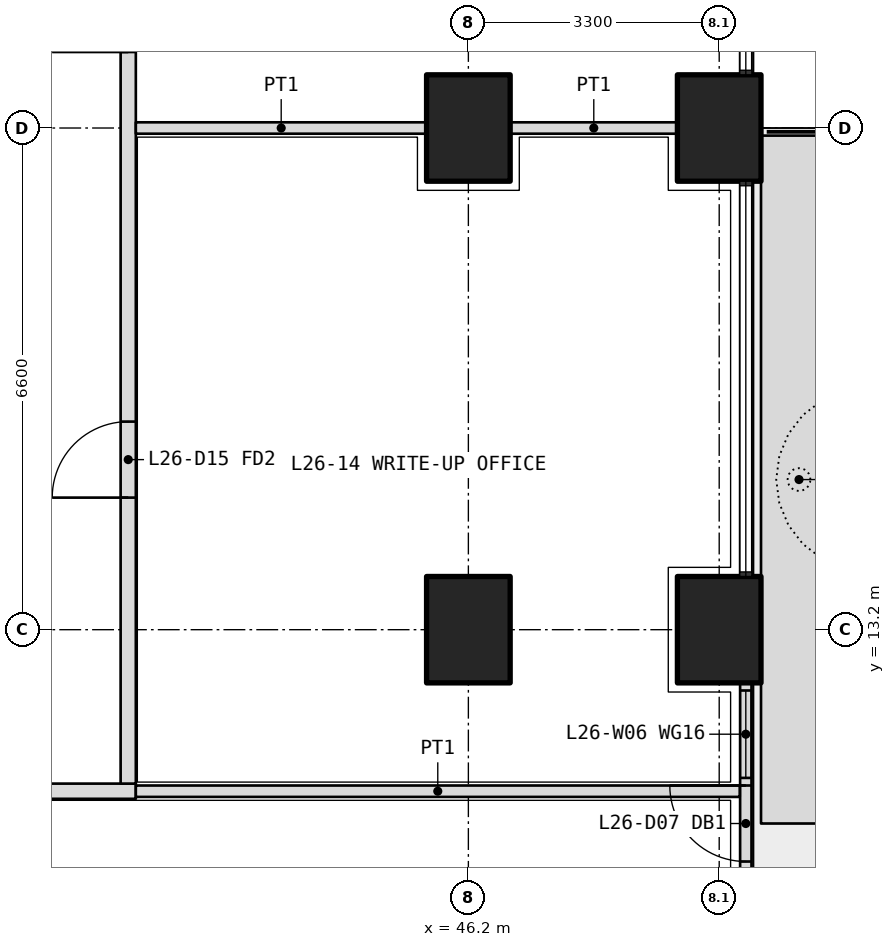
"""IFC4 building model, lengths in metres.
Left out: names, types, materials, properties, quantities, classifications, styles, units other than length and angle.
Written with IfcOpenShell. Run it as: python <this file> out.ifc"""

import sys

from ifc_helpers import new_model, si_unit, direction, frame, frame_2d, origin, origin_2d, place, context, subcontext, project, spatial, polyline, rectangle, outline, extrude, element, fill, save


model = new_model("IFC4")
c1 = context("Model", 3, precision=1e-05, world=origin(), true_north=direction((0.0, 1.0)))
c2 = subcontext(c1, "Body", "Model", "MODEL_VIEW")
j1 = project(units=[si_unit("LENGTHUNIT", "METRE"), si_unit("PLANEANGLEUNIT", "RADIAN")], contexts=[c1])
p1 = place(None, origin())
s1 = spatial("IfcSite", under=j1, at=p1, CompositionType="ELEMENT")
p2 = place(p1, origin())
s2 = spatial("IfcBuilding", under=s1, at=p2, CompositionType="ELEMENT")
p3 = place(p2, frame((0.0, 0.0, 115.8)))
s3 = spatial("IfcBuildingStorey", under=s2, at=p3, CompositionType="ELEMENT", Elevation=115.8)
for number, where, z_axis, x_axis in (
    (1, (49.5, 13.2, 0.0), (0.0, 0.0, 1.0), (0.0, 1.0, 0.0)),
    (2, (49.5, 19.8, 0.0), (0.0, 0.0, 1.0), (0.0, 1.0, 0.0)),
    (3, (46.2, 13.2, 0.0), (0.0, 0.0, 1.0), (0.0, 1.0, 0.0)),
    (4, (46.2, 19.8, 0.0), (0.0, 0.0, 1.0), (0.0, 1.0, 0.0)),
):
    element("IfcColumn", number, at=place(p3, frame(where, z_axis=z_axis, x_axis=x_axis)), inside=s3, PredefinedType="COLUMN", context=c2, shape_type="SweptSolid", body=[
        extrude(rectangle(XDim=1.4, YDim=1.1, at=origin_2d()), origin(), (0.0, 0.0, 1.0), 4.2),
    ])
p4 = place(p3, origin())
e5 = element("IfcWall", 5, at=p4, inside=s3, PredefinedType="USERDEFINED", context=c2, shape_type="SweptSolid", body=[
    extrude(outline(polyline([(50.05, 10.65), (51.05, 10.65), (51.05, 19.7), (50.05, 19.7), (50.05, 10.65)]), holes=[polyline([(50.2, 10.8), (50.9, 10.8), (50.9, 19.55), (50.2, 19.55), (50.2, 10.8)])]), origin(), (0.0, 0.0, 1.0), 1.05),
])
p5 = place(p3, frame((49.85, 7.3, 0.0), z_axis=(0.0, 0.0, 1.0), x_axis=(0.0, 1.0, 0.0)))
e6 = element("IfcWall", 6, at=p5, inside=s3, PredefinedType="SOLIDWALL", context=c2, shape_type="SweptSolid", body=[
    extrude(rectangle(XDim=5.2, YDim=0.15, at=frame_2d((2.6, 0.0))), origin(), (0.0, 0.0, 1.0), 2.7),
])
p6 = place(p5, frame((2.85, 0.0, 0.0)))
e7 = element("IfcOpeningElement", 7, at=p6, cuts=e6, PredefinedType="OPENING", context=c2, shape_type="SweptSolid", body=[
    extrude(rectangle(XDim=1.0, YDim=2.4, at=frame_2d((0.5, 1.2))), frame((0.0, 0.085, 0.0), z_axis=(0.0, -1.0, 0.0), x_axis=(1.0, 0.0, 0.0)), (0.0, 0.0, 1.0), 0.17),
])
p7 = place(p5, frame((0.1, 0.0, 0.1)))
e8 = element("IfcOpeningElement", 8, at=p7, cuts=e6, PredefinedType="OPENING", context=c2, shape_type="SweptSolid", body=[
    extrude(rectangle(XDim=2.25, YDim=2.3, at=frame_2d((1.125, 1.15))), frame((0.0, 0.085, 0.0), z_axis=(0.0, -1.0, 0.0), x_axis=(1.0, 0.0, 0.0)), (0.0, 0.0, 1.0), 0.17),
])
p8 = place(p5, frame((3.95, 0.0, 0.1)))
e9 = element("IfcOpeningElement", 9, at=p8, cuts=e6, PredefinedType="OPENING", context=c2, shape_type="SweptSolid", body=[
    extrude(rectangle(XDim=1.15, YDim=2.3, at=frame_2d((0.575, 1.15))), frame((0.0, 0.085, 0.0), z_axis=(0.0, -1.0, 0.0), x_axis=(1.0, 0.0, 0.0)), (0.0, 0.0, 1.0), 0.17),
])
p9 = place(p3, frame((29.7, 11.075, 0.0), z_axis=(0.0, 0.0, 1.0), x_axis=(1.0, 0.0, 0.0)))
e10 = element("IfcWall", 10, at=p9, inside=s3, PredefinedType="PARTITIONING", context=c2, shape_type="SweptSolid", body=[
    extrude(rectangle(XDim=12.125, YDim=0.2, at=frame_2d((6.062, 0.0))), origin(), (0.0, 0.0, 1.0), 2.85),
])
p10 = place(p9, frame((1.6, 0.0, 0.0)))
e11 = element("IfcOpeningElement", 11, at=p10, cuts=e10, PredefinedType="OPENING", context=c2, shape_type="SweptSolid", body=[
    extrude(rectangle(XDim=1.0, YDim=2.1, at=frame_2d((0.5, 1.05))), frame((0.0, 0.11, 0.0), z_axis=(0.0, -1.0, 0.0), x_axis=(1.0, 0.0, 0.0)), (0.0, 0.0, 1.0), 0.22),
])
p11 = place(p9, frame((4.9, 0.0, 0.0)))
e12 = element("IfcOpeningElement", 12, at=p11, cuts=e10, PredefinedType="OPENING", context=c2, shape_type="SweptSolid", body=[
    extrude(rectangle(XDim=1.0, YDim=2.1, at=frame_2d((0.5, 1.05))), frame((0.0, 0.11, 0.0), z_axis=(0.0, -1.0, 0.0), x_axis=(1.0, 0.0, 0.0)), (0.0, 0.0, 1.0), 0.22),
])
p12 = place(p9, frame((8.812, 0.0, 0.0)))
e13 = element("IfcOpeningElement", 13, at=p12, cuts=e10, PredefinedType="OPENING", context=c2, shape_type="SweptSolid", body=[
    extrude(rectangle(XDim=1.0, YDim=2.1, at=frame_2d((0.5, 1.05))), frame((0.0, 0.11, 0.0), z_axis=(0.0, -1.0, 0.0), x_axis=(1.0, 0.0, 0.0)), (0.0, 0.0, 1.0), 0.22),
])
p13 = place(p3, frame((41.725, 11.175, 0.0), z_axis=(0.0, 0.0, 1.0), x_axis=(0.0, 1.0, 0.0)))
e14 = element("IfcWall", 14, at=p13, inside=s3, PredefinedType="PARTITIONING", context=c2, shape_type="SweptSolid", body=[
    extrude(rectangle(XDim=27.625, YDim=0.2, at=frame_2d((13.812, 0.0))), origin(), (0.0, 0.0, 1.0), 2.85),
])
p14 = place(p13, frame((3.762, 0.0, 0.0)))
e15 = element("IfcOpeningElement", 15, at=p14, cuts=e14, PredefinedType="OPENING", context=c2, shape_type="SweptSolid", body=[
    extrude(rectangle(XDim=1.0, YDim=2.1, at=frame_2d((0.5, 1.05))), frame((0.0, 0.11, 0.0), z_axis=(0.0, -1.0, 0.0), x_axis=(1.0, 0.0, 0.0)), (0.0, 0.0, 1.0), 0.22),
])
p15 = place(p13, frame((9.625, 0.0, 0.0)))
e16 = element("IfcOpeningElement", 16, at=p15, cuts=e14, PredefinedType="OPENING", context=c2, shape_type="SweptSolid", body=[
    extrude(rectangle(XDim=1.0, YDim=2.1, at=frame_2d((0.5, 1.05))), frame((0.0, 0.11, 0.0), z_axis=(0.0, -1.0, 0.0), x_axis=(1.0, 0.0, 0.0)), (0.0, 0.0, 1.0), 0.22),
])
p16 = place(p13, frame((12.975, 0.0, 0.0)))
e17 = element("IfcOpeningElement", 17, at=p16, cuts=e14, PredefinedType="OPENING", context=c2, shape_type="SweptSolid", body=[
    extrude(rectangle(XDim=0.9, YDim=2.1, at=frame_2d((0.45, 1.05))), frame((0.0, 0.11, 0.0), z_axis=(0.0, -1.0, 0.0), x_axis=(1.0, 0.0, 0.0)), (0.0, 0.0, 1.0), 0.22),
])
p17 = place(p13, frame((19.675, 0.0, 0.0)))
e18 = element("IfcOpeningElement", 18, at=p17, cuts=e14, PredefinedType="OPENING", context=c2, shape_type="SweptSolid", body=[
    extrude(rectangle(XDim=1.0, YDim=2.1, at=frame_2d((0.5, 1.05))), frame((0.0, 0.11, 0.0), z_axis=(0.0, -1.0, 0.0), x_axis=(1.0, 0.0, 0.0)), (0.0, 0.0, 1.0), 0.22),
])
p18 = place(p13, frame((25.925, 0.0, 0.0)))
e19 = element("IfcOpeningElement", 19, at=p18, cuts=e14, PredefinedType="OPENING", context=c2, shape_type="SweptSolid", body=[
    extrude(rectangle(XDim=1.0, YDim=2.1, at=frame_2d((0.5, 1.05))), frame((0.0, 0.11, 0.0), z_axis=(0.0, -1.0, 0.0), x_axis=(1.0, 0.0, 0.0)), (0.0, 0.0, 1.0), 0.22),
])
p19 = place(p3, frame((49.77, 11.075, 0.0), z_axis=(0.0, 0.0, 1.0), x_axis=(-1.0, 0.0, 0.0)))
e20 = element("IfcWall", 20, at=p19, inside=s3, PredefinedType="PARTITIONING", context=c2, shape_type="SweptSolid", body=[
    extrude(rectangle(XDim=7.945, YDim=0.15, at=frame_2d((3.973, 0.0))), origin(), (0.0, 0.0, 1.0), 2.7),
])
p20 = place(p3, frame((48.95, 19.8, 0.0), z_axis=(0.0, 0.0, 1.0), x_axis=(-1.0, 0.0, 0.0)))
e21 = element("IfcWall", 21, at=p20, inside=s3, PredefinedType="PARTITIONING", context=c2, shape_type="SweptSolid", body=[
    extrude(rectangle(XDim=2.2, YDim=0.15, at=frame_2d((1.1, 0.0))), origin(), (0.0, 0.0, 1.0), 2.85),
])
p21 = place(p3, frame((45.65, 19.8, 0.0), z_axis=(0.0, 0.0, 1.0), x_axis=(-1.0, 0.0, 0.0)))
e22 = element("IfcWall", 22, at=p21, inside=s3, PredefinedType="PARTITIONING", context=c2, shape_type="SweptSolid", body=[
    extrude(rectangle(XDim=3.825, YDim=0.15, at=frame_2d((1.913, 0.0))), origin(), (0.0, 0.0, 1.0), 2.85),
])
p22 = place(p6, origin())
e23 = element("IfcDoor", 23, at=p22, inside=s3, OperationType="SINGLE_SWING_RIGHT", PredefinedType="DOOR", context=c2, shape_type="SweptSolid", body=[
    extrude(rectangle(XDim=1.0, YDim=2.4, at=frame_2d((0.5, 1.2))), frame((0.0, 0.025, 0.0), z_axis=(0.0, -1.0, 0.0), x_axis=(1.0, 0.0, 0.0)), (0.0, 0.0, 1.0), 0.05),
])
fill(e7, e23)
p23 = place(p8, origin())
e24 = element("IfcWindow", 24, at=p23, inside=s3, PartitioningType="SINGLE_PANEL", PredefinedType="WINDOW", context=c2, shape_type="SweptSolid", body=[
    extrude(rectangle(XDim=1.15, YDim=2.3, at=frame_2d((0.575, 1.15))), frame((0.0, 0.03, 0.0), z_axis=(0.0, -1.0, 0.0), x_axis=(1.0, 0.0, 0.0)), (0.0, 0.0, 1.0), 0.06),
])
fill(e9, e24)
p24 = place(p14, origin())
e25 = element("IfcDoor", 25, at=p24, inside=s3, OperationType="SINGLE_SWING_LEFT", PredefinedType="DOOR", context=c2, shape_type="SweptSolid", body=[
    extrude(rectangle(XDim=1.0, YDim=2.1, at=frame_2d((0.5, 1.05))), frame((0.0, 0.025, 0.0), z_axis=(0.0, -1.0, 0.0), x_axis=(1.0, 0.0, 0.0)), (0.0, 0.0, 1.0), 0.05),
])
fill(e15, e25)
save(model, sys.argv[1])
